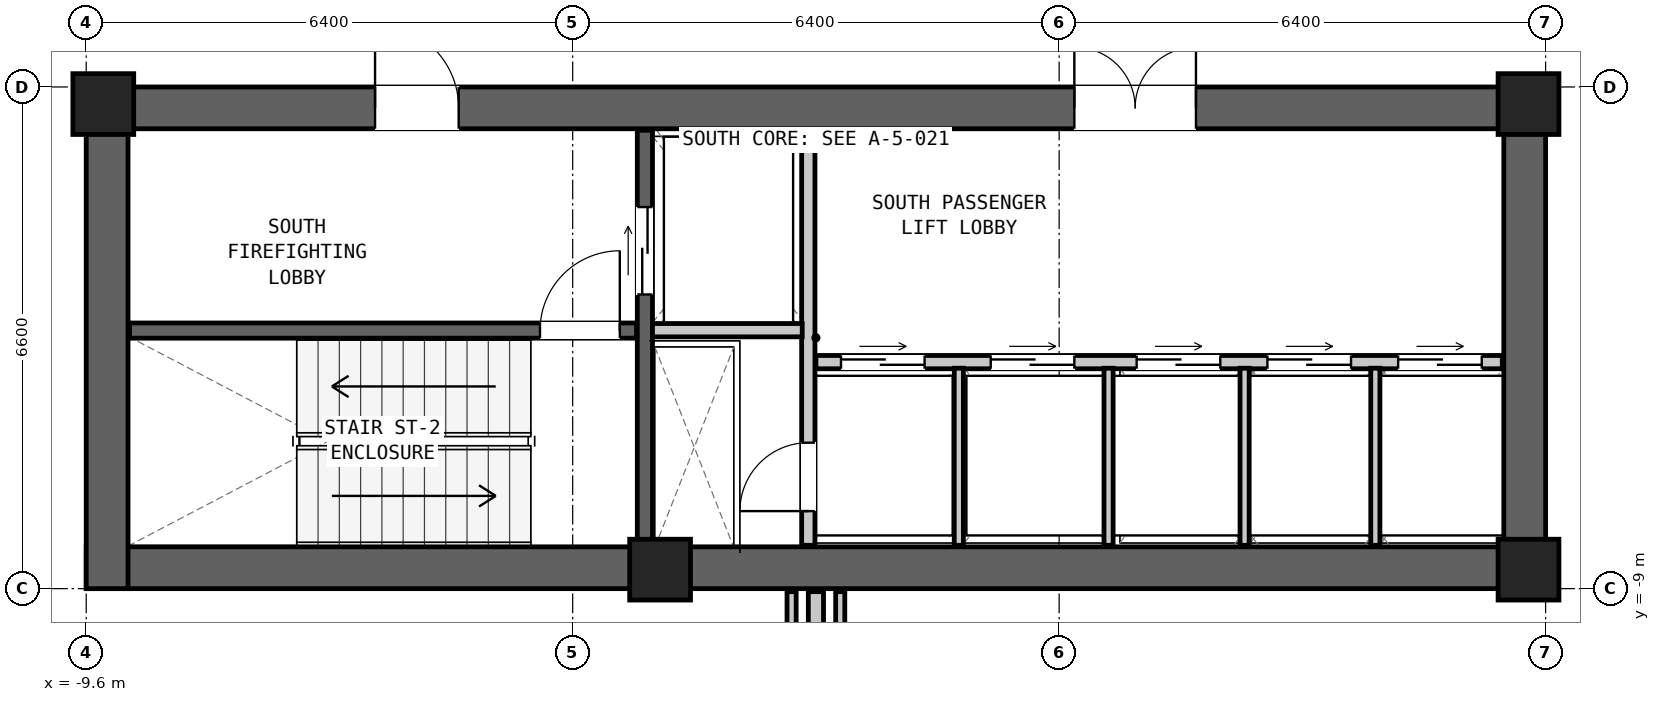
"""IFC4 building model, lengths in metres.
Left out: names, types, materials, properties, quantities, classifications, styles, units other than length and angle.
Written with IfcOpenShell. Run it as: python <this file> out.ifc"""

import sys

from ifc_helpers import new_model, si_unit, direction, frame, frame_2d, origin, origin_2d, place, context, subcontext, project, spatial, rectangle, extrude, element, fill, save


model = new_model("IFC4")
c1 = context("Model", 3, precision=1e-05, world=origin(), true_north=direction((0.0, 1.0)))
c2 = subcontext(c1, "Body", "Model", "MODEL_VIEW")
j1 = project(units=[si_unit("LENGTHUNIT", "METRE"), si_unit("PLANEANGLEUNIT", "RADIAN")], contexts=[c1])
p1 = place(None, origin())
s1 = spatial("IfcSite", under=j1, at=p1, CompositionType="ELEMENT")
p2 = place(p1, origin())
s2 = spatial("IfcBuilding", under=s1, at=p2, CompositionType="ELEMENT")
p3 = place(p2, frame((0.0, 0.0, 65.1)))
s3 = spatial("IfcBuildingStorey", under=s2, at=p3, CompositionType="ELEMENT", Elevation=65.1)
p4 = place(p3, frame((-9.6, -8.725, 0.0), z_axis=(0.0, 0.0, 1.0), x_axis=(1.0, 0.0, 0.0)))
e1 = element("IfcWall", 1, at=p4, inside=s3, PredefinedType="SHEAR", context=c2, shape_type="SweptSolid", body=[
    extrude(rectangle(XDim=19.2, YDim=0.55, at=frame_2d((9.6, 0.0))), origin(), (0.0, 0.0, 1.0), 4.35),
])
p5 = place(p3, frame((-9.6, -2.675, 0.0), z_axis=(0.0, 0.0, 1.0), x_axis=(1.0, 0.0, 0.0)))
e2 = element("IfcWall", 2, at=p5, inside=s3, PredefinedType="SHEAR", context=c2, shape_type="SweptSolid", body=[
    extrude(rectangle(XDim=19.2, YDim=0.55, at=frame_2d((9.6, 0.0))), origin(), (0.0, 0.0, 1.0), 4.35),
])
p6 = place(p5, frame((3.8, 0.0, 0.0)))
e3 = element("IfcOpeningElement", 3, at=p6, cuts=e2, PredefinedType="OPENING", context=c2, shape_type="SweptSolid", body=[
    extrude(rectangle(XDim=1.1, YDim=2.08, at=frame_2d((0.55, 1.04))), frame((0.0, 0.287, 0.0), z_axis=(0.0, -1.0, 0.0), x_axis=(1.0, 0.0, 0.0)), (0.0, 0.0, 1.0), 0.574),
])
p7 = place(p5, frame((13.0, 0.0, 0.0)))
e4 = element("IfcOpeningElement", 4, at=p7, cuts=e2, PredefinedType="OPENING", context=c2, shape_type="SweptSolid", body=[
    extrude(rectangle(XDim=1.6, YDim=2.12, at=frame_2d((0.8, 1.06))), frame((0.0, 0.287, 0.0), z_axis=(0.0, -1.0, 0.0), x_axis=(1.0, 0.0, 0.0)), (0.0, 0.0, 1.0), 0.574),
])
for number, where, z_axis, x_axis in (
    (5, (-9.325, -9.0, 0.0), (0.0, 0.0, 1.0), (0.0, 1.0, 0.0)),
    (6, (9.325, -9.0, 0.0), (0.0, 0.0, 1.0), (0.0, 1.0, 0.0)),
):
    element("IfcWall", number, at=place(p3, frame(where, z_axis=z_axis, x_axis=x_axis)), inside=s3, PredefinedType="SHEAR", context=c2, shape_type="SweptSolid", body=[
        extrude(rectangle(XDim=6.6, YDim=0.55, at=frame_2d((3.3, 0.0))), origin(), (0.0, 0.0, 1.0), 4.35),
    ])
for number, where, z_axis, x_axis in (
    (7, (-9.375, -2.625, 0.0), (0.0, 0.0, 1.0), (1.0, 0.0, 0.0)),
    (8, (9.375, -2.625, 0.0), (0.0, 0.0, 1.0), (1.0, 0.0, 0.0)),
    (9, (-2.05, -8.75, 0.0), (0.0, 0.0, 1.0), (1.0, 0.0, 0.0)),
    (10, (9.375, -8.75, 0.0), (0.0, 0.0, 1.0), (1.0, 0.0, 0.0)),
):
    element("IfcColumn", number, at=place(p3, frame(where, z_axis=z_axis, x_axis=x_axis)), inside=s3, PredefinedType="COLUMN", context=c2, shape_type="SweptSolid", body=[
        extrude(rectangle(XDim=0.8, YDim=0.8, at=origin_2d()), origin(), (0.0, 0.0, 1.0), 4.35),
    ])
p8 = place(p3, frame((-9.03, -5.605, 0.0), z_axis=(0.0, 0.0, 1.0), x_axis=(1.0, 0.0, 0.0)))
e11 = element("IfcWall", 11, at=p8, inside=s3, PredefinedType="SHEAR", context=c2, shape_type="SweptSolid", body=[
    extrude(rectangle(XDim=6.67, YDim=0.2, at=frame_2d((3.335, 0.0))), origin(), (0.0, 0.0, 1.0), 4.13),
])
p9 = place(p8, frame((5.4, 0.0, 0.0)))
e12 = element("IfcOpeningElement", 12, at=p9, cuts=e11, PredefinedType="OPENING", context=c2, shape_type="SweptSolid", body=[
    extrude(rectangle(XDim=1.05, YDim=2.08, at=frame_2d((0.525, 1.04))), frame((0.0, 0.112, 0.0), z_axis=(0.0, -1.0, 0.0), x_axis=(1.0, 0.0, 0.0)), (0.0, 0.0, 1.0), 0.224),
])
p10 = place(p3, frame((-2.25, -8.43, 0.0), z_axis=(0.0, 0.0, 1.0), x_axis=(0.0, 1.0, 0.0)))
e13 = element("IfcWall", 13, at=p10, inside=s3, PredefinedType="SHEAR", context=c2, shape_type="SweptSolid", body=[
    extrude(rectangle(XDim=5.46, YDim=0.2, at=frame_2d((2.73, 0.0))), origin(), (0.0, 0.0, 1.0), 4.13),
])
p11 = place(p10, frame((3.3, 0.0, 0.0)))
e14 = element("IfcOpeningElement", 14, at=p11, cuts=e13, PredefinedType="OPENING", context=c2, shape_type="SweptSolid", body=[
    extrude(rectangle(XDim=1.15, YDim=2.08, at=frame_2d((0.575, 1.04))), frame((0.0, 0.112, 0.0), z_axis=(0.0, -1.0, 0.0), x_axis=(1.0, 0.0, 0.0)), (0.0, 0.0, 1.0), 0.224),
])
p12 = place(p3, frame((-0.1, -8.43, 0.0), z_axis=(0.0, 0.0, 1.0), x_axis=(0.0, 1.0, 0.0)))
e15 = element("IfcWall", 15, at=p12, inside=s3, PredefinedType="PARTITIONING", context=c2, shape_type="SweptSolid", body=[
    extrude(rectangle(XDim=5.46, YDim=0.175, at=frame_2d((2.73, 0.0))), origin(), (0.0, 0.0, 1.0), 4.13),
])
p13 = place(p12, frame((0.45, 0.0, 0.0)))
e16 = element("IfcOpeningElement", 16, at=p13, cuts=e15, PredefinedType="OPENING", context=c2, shape_type="SweptSolid", body=[
    extrude(rectangle(XDim=0.9, YDim=2.05, at=frame_2d((0.45, 1.025))), frame((0.0, 0.1, 0.0), z_axis=(0.0, -1.0, 0.0), x_axis=(1.0, 0.0, 0.0)), (0.0, 0.0, 1.0), 0.199),
])
p14 = place(p3, frame((-2.15, -5.6, 0.0), z_axis=(0.0, 0.0, 1.0), x_axis=(1.0, 0.0, 0.0)))
e17 = element("IfcWall", 17, at=p14, inside=s3, PredefinedType="PARTITIONING", context=c2, shape_type="SweptSolid", body=[
    extrude(rectangle(XDim=1.97, YDim=0.175, at=frame_2d((0.985, 0.0))), origin(), (0.0, 0.0, 1.0), 4.13),
])
p15 = place(p3, frame((0.0, -6.02, 0.0), z_axis=(0.0, 0.0, 1.0), x_axis=(1.0, 0.0, 0.0)))
e18 = element("IfcWall", 18, at=p15, inside=s3, PredefinedType="PARTITIONING", context=c2, shape_type="SweptSolid", body=[
    extrude(rectangle(XDim=9.03, YDim=0.175, at=frame_2d((4.515, 0.0))), origin(), (0.0, 0.0, 1.0), 4.13),
])
p16 = place(p15, frame((0.33, 0.0, 0.0)))
e19 = element("IfcOpeningElement", 19, at=p16, cuts=e18, PredefinedType="OPENING", context=c2, shape_type="SweptSolid", body=[
    extrude(rectangle(XDim=1.1, YDim=2.06, at=frame_2d((0.55, 1.03))), frame((0.0, 0.1, 0.0), z_axis=(0.0, -1.0, 0.0), x_axis=(1.0, 0.0, 0.0)), (0.0, 0.0, 1.0), 0.199),
])
p17 = place(p15, frame((2.3, 0.0, 0.0)))
e20 = element("IfcOpeningElement", 20, at=p17, cuts=e18, PredefinedType="OPENING", context=c2, shape_type="SweptSolid", body=[
    extrude(rectangle(XDim=1.1, YDim=2.06, at=frame_2d((0.55, 1.03))), frame((0.0, 0.1, 0.0), z_axis=(0.0, -1.0, 0.0), x_axis=(1.0, 0.0, 0.0)), (0.0, 0.0, 1.0), 0.199),
])
p18 = place(p15, frame((4.22, 0.0, 0.0)))
e21 = element("IfcOpeningElement", 21, at=p18, cuts=e18, PredefinedType="OPENING", context=c2, shape_type="SweptSolid", body=[
    extrude(rectangle(XDim=1.1, YDim=2.06, at=frame_2d((0.55, 1.03))), frame((0.0, 0.1, 0.0), z_axis=(0.0, -1.0, 0.0), x_axis=(1.0, 0.0, 0.0)), (0.0, 0.0, 1.0), 0.199),
])
p19 = place(p15, frame((5.94, 0.0, 0.0)))
e22 = element("IfcOpeningElement", 22, at=p19, cuts=e18, PredefinedType="OPENING", context=c2, shape_type="SweptSolid", body=[
    extrude(rectangle(XDim=1.1, YDim=2.06, at=frame_2d((0.55, 1.03))), frame((0.0, 0.1, 0.0), z_axis=(0.0, -1.0, 0.0), x_axis=(1.0, 0.0, 0.0)), (0.0, 0.0, 1.0), 0.199),
])
p20 = place(p15, frame((7.66, 0.0, 0.0)))
e23 = element("IfcOpeningElement", 23, at=p20, cuts=e18, PredefinedType="OPENING", context=c2, shape_type="SweptSolid", body=[
    extrude(rectangle(XDim=1.1, YDim=2.06, at=frame_2d((0.55, 1.03))), frame((0.0, 0.1, 0.0), z_axis=(0.0, -1.0, 0.0), x_axis=(1.0, 0.0, 0.0)), (0.0, 0.0, 1.0), 0.199),
])
for number, where, z_axis, x_axis in (
    (24, (1.88, -8.43, 0.0), (0.0, 0.0, 1.0), (0.0, 1.0, 0.0)),
    (25, (3.85, -8.43, 0.0), (0.0, 0.0, 1.0), (0.0, 1.0, 0.0)),
    (26, (5.64, -8.43, 0.0), (0.0, 0.0, 1.0), (0.0, 1.0, 0.0)),
    (27, (7.36, -8.43, 0.0), (0.0, 0.0, 1.0), (0.0, 1.0, 0.0)),
):
    element("IfcWall", number, at=place(p3, frame(where, z_axis=z_axis, x_axis=x_axis)), inside=s3, PredefinedType="PARTITIONING", context=c2, shape_type="SweptSolid", body=[
        extrude(rectangle(XDim=2.33, YDim=0.12, at=frame_2d((1.165, 0.0))), origin(), (0.0, 0.0, 1.0), 4.13),
    ])
p21 = place(p3, frame((0.0, -19.51, 0.0), z_axis=(0.0, 0.0, 1.0), x_axis=(0.0, 1.0, 0.0)))
e28 = element("IfcWall", 28, at=p21, inside=s3, PredefinedType="PARTITIONING", context=c2, shape_type="SweptSolid", body=[
    extrude(rectangle(XDim=10.47, YDim=0.2, at=frame_2d((5.235, 0.0))), origin(), (0.0, 0.0, 1.0), 2.31),
])
for number, where, z_axis, x_axis in (
    (29, (-0.32, -11.4, 0.0), (0.0, 0.0, 1.0), (0.0, 1.0, 0.0)),
    (30, (0.32, -11.4, 0.0), (0.0, 0.0, 1.0), (0.0, 1.0, 0.0)),
):
    element("IfcWall", number, at=place(p3, frame(where, z_axis=z_axis, x_axis=x_axis)), inside=s3, PredefinedType="PARTITIONING", context=c2, shape_type="SweptSolid", body=[
        extrude(rectangle(XDim=2.36, YDim=0.12, at=frame_2d((1.18, 0.0))), origin(), (0.0, 0.0, 1.0), 2.31),
    ])
p22 = place(p9, origin())
e31 = element("IfcDoor", 31, at=p22, inside=s3, OperationType="SINGLE_SWING_RIGHT", PredefinedType="DOOR", context=c2, shape_type="SweptSolid", body=[
    extrude(rectangle(XDim=1.05, YDim=2.08, at=frame_2d((0.525, 1.04))), frame((0.0, 0.025, 0.0), z_axis=(0.0, -1.0, 0.0), x_axis=(1.0, 0.0, 0.0)), (0.0, 0.0, 1.0), 0.05),
])
fill(e12, e31)
p23 = place(p6, origin())
e32 = element("IfcDoor", 32, at=p23, inside=s3, OperationType="SINGLE_SWING_LEFT", PredefinedType="DOOR", context=c2, shape_type="SweptSolid", body=[
    extrude(rectangle(XDim=1.1, YDim=2.08, at=frame_2d((0.55, 1.04))), frame((0.0, 0.025, 0.0), z_axis=(0.0, -1.0, 0.0), x_axis=(1.0, 0.0, 0.0)), (0.0, 0.0, 1.0), 0.05),
])
fill(e3, e32)
p24 = place(p11, origin())
e33 = element("IfcDoor", 33, at=p24, inside=s3, OperationType="DOUBLE_DOOR_SLIDING", PredefinedType="DOOR", context=c2, shape_type="SweptSolid", body=[
    extrude(rectangle(XDim=1.15, YDim=2.08, at=frame_2d((0.575, 1.04))), frame((0.0, 0.025, 0.0), z_axis=(0.0, -1.0, 0.0), x_axis=(1.0, 0.0, 0.0)), (0.0, 0.0, 1.0), 0.05),
])
fill(e14, e33)
p25 = place(p13, origin())
e34 = element("IfcDoor", 34, at=p25, inside=s3, OperationType="SINGLE_SWING_LEFT", PredefinedType="DOOR", context=c2, shape_type="SweptSolid", body=[
    extrude(rectangle(XDim=0.9, YDim=2.05, at=frame_2d((0.45, 1.025))), frame((0.0, 0.025, 0.0), z_axis=(0.0, -1.0, 0.0), x_axis=(1.0, 0.0, 0.0)), (0.0, 0.0, 1.0), 0.05),
])
fill(e16, e34)
p26 = place(p7, origin())
e35 = element("IfcDoor", 35, at=p26, inside=s3, OperationType="DOUBLE_DOOR_SINGLE_SWING", PredefinedType="DOOR", context=c2, shape_type="SweptSolid", body=[
    extrude(rectangle(XDim=1.6, YDim=2.12, at=frame_2d((0.8, 1.06))), frame((0.0, 0.025, 0.0), z_axis=(0.0, -1.0, 0.0), x_axis=(1.0, 0.0, 0.0)), (0.0, 0.0, 1.0), 0.05),
])
fill(e4, e35)
p27 = place(p16, origin())
e36 = element("IfcDoor", 36, at=p27, inside=s3, OperationType="DOUBLE_DOOR_SLIDING", PredefinedType="DOOR", context=c2, shape_type="SweptSolid", body=[
    extrude(rectangle(XDim=1.1, YDim=2.06, at=frame_2d((0.55, 1.03))), frame((0.0, 0.025, 0.0), z_axis=(0.0, -1.0, 0.0), x_axis=(1.0, 0.0, 0.0)), (0.0, 0.0, 1.0), 0.05),
])
fill(e19, e36)
p28 = place(p17, origin())
e37 = element("IfcDoor", 37, at=p28, inside=s3, OperationType="DOUBLE_DOOR_SLIDING", PredefinedType="DOOR", context=c2, shape_type="SweptSolid", body=[
    extrude(rectangle(XDim=1.1, YDim=2.06, at=frame_2d((0.55, 1.03))), frame((0.0, 0.025, 0.0), z_axis=(0.0, -1.0, 0.0), x_axis=(1.0, 0.0, 0.0)), (0.0, 0.0, 1.0), 0.05),
])
fill(e20, e37)
p29 = place(p18, origin())
e38 = element("IfcDoor", 38, at=p29, inside=s3, OperationType="DOUBLE_DOOR_SLIDING", PredefinedType="DOOR", context=c2, shape_type="SweptSolid", body=[
    extrude(rectangle(XDim=1.1, YDim=2.06, at=frame_2d((0.55, 1.03))), frame((0.0, 0.025, 0.0), z_axis=(0.0, -1.0, 0.0), x_axis=(1.0, 0.0, 0.0)), (0.0, 0.0, 1.0), 0.05),
])
fill(e21, e38)
p30 = place(p19, origin())
e39 = element("IfcDoor", 39, at=p30, inside=s3, OperationType="DOUBLE_DOOR_SLIDING", PredefinedType="DOOR", context=c2, shape_type="SweptSolid", body=[
    extrude(rectangle(XDim=1.1, YDim=2.06, at=frame_2d((0.55, 1.03))), frame((0.0, 0.025, 0.0), z_axis=(0.0, -1.0, 0.0), x_axis=(1.0, 0.0, 0.0)), (0.0, 0.0, 1.0), 0.05),
])
fill(e22, e39)
p31 = place(p20, origin())
e40 = element("IfcDoor", 40, at=p31, inside=s3, OperationType="DOUBLE_DOOR_SLIDING", PredefinedType="DOOR", context=c2, shape_type="SweptSolid", body=[
    extrude(rectangle(XDim=1.1, YDim=2.06, at=frame_2d((0.55, 1.03))), frame((0.0, 0.025, 0.0), z_axis=(0.0, -1.0, 0.0), x_axis=(1.0, 0.0, 0.0)), (0.0, 0.0, 1.0), 0.05),
])
fill(e23, e40)
save(model, sys.argv[1])
